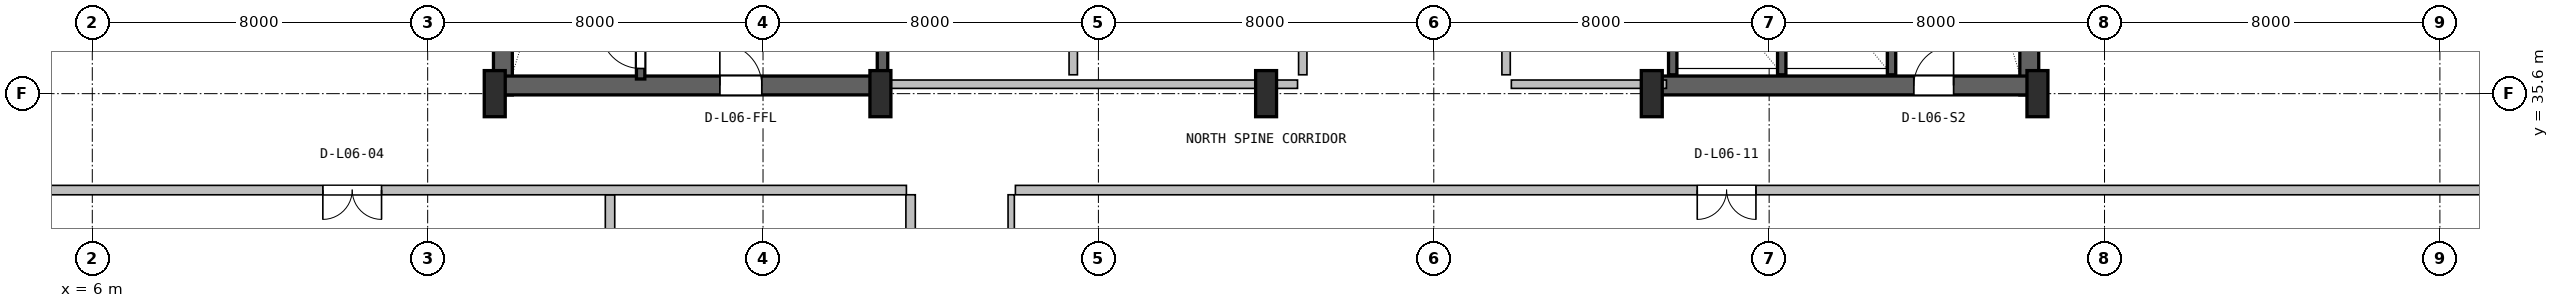
"""IFC4 building model, lengths in metres.
Left out: names, types, materials, properties, quantities, classifications, styles, units other than length and angle.
Written with IfcOpenShell. Run it as: python <this file> out.ifc"""

import sys

from ifc_helpers import new_model, si_unit, direction, frame, frame_2d, origin, origin_2d, place, context, subcontext, project, spatial, rectangle, i_section, extrude, source, transform, mapped, element, fill, save


model = new_model("IFC4")
c1 = context("Model", 3, precision=1e-05, world=origin(), true_north=direction((0.0, 1.0)))
c2 = subcontext(c1, "Body", "Model", "MODEL_VIEW")
j1 = project(units=[si_unit("LENGTHUNIT", "METRE"), si_unit("PLANEANGLEUNIT", "RADIAN")], contexts=[c1])
p1 = place(None, origin())
s1 = spatial("IfcSite", under=j1, at=p1, CompositionType="ELEMENT")
p2 = place(p1, origin())
s2 = spatial("IfcBuilding", under=s1, at=p2, CompositionType="ELEMENT")
p3 = place(p2, frame((0.0, 0.0, 31.5)))
s3 = spatial("IfcBuildingStorey", under=s2, at=p3, CompositionType="ELEMENT", Elevation=31.5)
for number, where, z_axis, x_axis in (
    (1, (15.795, 35.57, 0.0), (0.0, 0.0, 1.0), (0.0, 1.0, 0.0)),
    (2, (52.205, 35.57, 0.0), (0.0, 0.0, 1.0), (0.0, 1.0, 0.0)),
):
    element("IfcWall", number, at=place(p3, frame(where, z_axis=z_axis, x_axis=x_axis)), inside=s3, PredefinedType="SHEAR", context=c2, shape_type="SweptSolid", body=[
        extrude(rectangle(XDim=11.23, YDim=0.45, at=frame_2d((5.615, 0.0))), origin(), (0.0, 0.0, 1.0), 3.65),
    ])
p4 = place(p3, frame((15.57, 35.795, 0.0), z_axis=(0.0, 0.0, 1.0), x_axis=(1.0, 0.0, 0.0)))
e3 = element("IfcWall", 3, at=p4, inside=s3, PredefinedType="SHEAR", context=c2, shape_type="SweptSolid", body=[
    extrude(rectangle(XDim=9.23, YDim=0.45, at=frame_2d((4.615, 0.0))), origin(), (0.0, 0.0, 1.0), 3.65),
])
p5 = place(p4, frame((5.4, 0.0, 0.0)))
e4 = element("IfcOpeningElement", 4, at=p5, cuts=e3, PredefinedType="OPENING", context=c2, shape_type="SweptSolid", body=[
    extrude(rectangle(XDim=1.0, YDim=2.1, at=frame_2d((0.5, 1.05))), frame((0.0, 0.235, 0.0), z_axis=(0.0, -1.0, 0.0), x_axis=(1.0, 0.0, 0.0)), (0.0, 0.0, 1.0), 0.47),
])
p6 = place(p3, frame((43.2, 35.795, 0.0), z_axis=(0.0, 0.0, 1.0), x_axis=(1.0, 0.0, 0.0)))
e5 = element("IfcWall", 5, at=p6, inside=s3, PredefinedType="SHEAR", context=c2, shape_type="SweptSolid", body=[
    extrude(rectangle(XDim=9.23, YDim=0.45, at=frame_2d((4.615, 0.0))), origin(), (0.0, 0.0, 1.0), 3.65),
])
p7 = place(p6, frame((6.25, 0.0, 0.0)))
e6 = element("IfcOpeningElement", 6, at=p7, cuts=e5, PredefinedType="OPENING", context=c2, shape_type="SweptSolid", body=[
    extrude(rectangle(XDim=0.95, YDim=2.1, at=frame_2d((0.475, 1.05))), frame((0.0, 0.235, 0.0), z_axis=(0.0, -1.0, 0.0), x_axis=(1.0, 0.0, 0.0)), (0.0, 0.0, 1.0), 0.47),
])
m1 = source(origin(), c2, "Body", "SweptSolid", [
    extrude(i_section(OverallWidth=0.5, OverallDepth=1.1, WebThickness=0.018, FlangeThickness=0.032, FilletRadius=0.018, at=origin_2d()), origin(), (0.0, 0.0, 1.0), 3.9),
])
for number, where, z_axis, x_axis in (
    (7, (15.6, 35.6, 0.0), (0.0, 0.0, 1.0), (1.0, 0.0, 0.0)),
    (8, (24.8, 35.6, 0.0), (0.0, 0.0, 1.0), (1.0, 0.0, 0.0)),
    (9, (34.0, 35.6, 0.0), (0.0, 0.0, 1.0), (1.0, 0.0, 0.0)),
    (10, (43.2, 35.6, 0.0), (0.0, 0.0, 1.0), (1.0, 0.0, 0.0)),
    (11, (52.4, 35.6, 0.0), (0.0, 0.0, 1.0), (1.0, 0.0, 0.0)),
):
    element("IfcColumn", number, at=place(p3, frame(where, z_axis=z_axis, x_axis=x_axis)), inside=s3, PredefinedType="COLUMN", context=c2, shape_type="MappedRepresentation", body=[
        mapped(m1, transform((0.0, 0.0, 0.0), x_axis=(1.0, 0.0, 0.0), y_axis=(0.0, 1.0, 0.0), z_axis=(0.0, 0.0, 1.0), scale=1.0)),
    ])
p8 = place(p3, frame((19.08, 35.95, 0.0), z_axis=(0.0, 0.0, 1.0), x_axis=(0.0, 1.0, 0.0)))
e12 = element("IfcWall", 12, at=p8, inside=s3, PredefinedType="SHEAR", context=c2, shape_type="SweptSolid", body=[
    extrude(rectangle(XDim=9.65, YDim=0.2, at=frame_2d((4.825, 0.0))), origin(), (0.0, 0.0, 1.0), 3.65),
])
p9 = place(p8, frame((0.25, 0.0, 0.0)))
e13 = element("IfcOpeningElement", 13, at=p9, cuts=e12, PredefinedType="OPENING", context=c2, shape_type="SweptSolid", body=[
    extrude(rectangle(XDim=0.95, YDim=2.1, at=frame_2d((0.475, 1.05))), frame((0.0, 0.11, 0.0), z_axis=(0.0, -1.0, 0.0), x_axis=(1.0, 0.0, 0.0)), (0.0, 0.0, 1.0), 0.22),
])
p10 = place(p3, frame((24.85, 36.05, 0.0), z_axis=(0.0, 0.0, 1.0), x_axis=(0.0, 1.0, 0.0)))
e14 = element("IfcWall", 14, at=p10, inside=s3, PredefinedType="SHEAR", context=c2, shape_type="SweptSolid", body=[
    extrude(rectangle(XDim=10.45, YDim=0.25, at=frame_2d((5.225, 0.0))), origin(), (0.0, 0.0, 1.0), 3.65),
])
p11 = place(p3, frame((48.92, 36.05, 0.0), z_axis=(0.0, 0.0, 1.0), x_axis=(0.0, 1.0, 0.0)))
e15 = element("IfcWall", 15, at=p11, inside=s3, PredefinedType="SHEAR", context=c2, shape_type="SweptSolid", body=[
    extrude(rectangle(XDim=10.5, YDim=0.2, at=frame_2d((5.25, 0.0))), origin(), (0.0, 0.0, 1.0), 3.65),
])
for number, where, z_axis, x_axis in (
    (16, (43.7, 36.05, 0.0), (0.0, 0.0, 1.0), (0.0, 1.0, 0.0)),
    (17, (46.3, 36.05, 0.0), (0.0, 0.0, 1.0), (0.0, 1.0, 0.0)),
):
    element("IfcWall", number, at=place(p3, frame(where, z_axis=z_axis, x_axis=x_axis)), inside=s3, PredefinedType="SHEAR", context=c2, shape_type="SweptSolid", body=[
        extrude(rectangle(XDim=3.05, YDim=0.2, at=frame_2d((1.525, 0.0))), origin(), (0.0, 0.0, 1.0), 3.65),
    ])
p12 = place(p3, frame((25.0, 35.825, 0.0), z_axis=(0.0, 0.0, 1.0), x_axis=(1.0, 0.0, 0.0)))
e18 = element("IfcWall", 18, at=p12, inside=s3, PredefinedType="PLUMBINGWALL", context=c2, shape_type="SweptSolid", body=[
    extrude(rectangle(XDim=9.75, YDim=0.2, at=frame_2d((4.875, 0.0))), origin(), (0.0, 0.0, 1.0), 2.425),
])
for number, where, z_axis, x_axis in (
    (19, (29.4, 36.05, 0.0), (0.0, 0.0, 1.0), (0.0, 1.0, 0.0)),
    (20, (34.875, 36.05, 0.0), (0.0, 0.0, 1.0), (0.0, 1.0, 0.0)),
):
    element("IfcWall", number, at=place(p3, frame(where, z_axis=z_axis, x_axis=x_axis)), inside=s3, PredefinedType="PLUMBINGWALL", context=c2, shape_type="SweptSolid", body=[
        extrude(rectangle(XDim=3.1, YDim=0.2, at=frame_2d((1.55, 0.0))), origin(), (0.0, 0.0, 1.0), 3.63),
    ])
p13 = place(p3, frame((39.85, 35.825, 0.0), z_axis=(0.0, 0.0, 1.0), x_axis=(1.0, 0.0, 0.0)))
e21 = element("IfcWall", 21, at=p13, inside=s3, PredefinedType="SOLIDWALL", context=c2, shape_type="SweptSolid", body=[
    extrude(rectangle(XDim=3.7, YDim=0.2, at=frame_2d((1.85, 0.0))), origin(), (0.0, 0.0, 1.0), 2.425),
])
p14 = place(p3, frame((39.725, 36.05, 0.0), z_axis=(0.0, 0.0, 1.0), x_axis=(0.0, 1.0, 0.0)))
e22 = element("IfcWall", 22, at=p14, inside=s3, PredefinedType="SOLIDWALL", context=c2, shape_type="SweptSolid", body=[
    extrude(rectangle(XDim=3.1, YDim=0.2, at=frame_2d((1.55, 0.0))), origin(), (0.0, 0.0, 1.0), 3.63),
])
p15 = place(p3, frame((18.35, 1.38, 0.0), z_axis=(0.0, 0.0, 1.0), x_axis=(0.0, 1.0, 0.0)))
e23 = element("IfcWall", 23, at=p15, inside=s3, PredefinedType="PARTITIONING", context=c2, shape_type="SweptSolid", body=[
    extrude(rectangle(XDim=31.808, YDim=0.225, at=frame_2d((15.904, 0.0))), origin(), (0.0, 0.0, 1.0), 3.208),
])
p16 = place(p3, frame((2.18, 33.3, 0.0), z_axis=(0.0, 0.0, 1.0), x_axis=(1.0, 0.0, 0.0)))
e24 = element("IfcWall", 24, at=p16, inside=s3, PredefinedType="PARTITIONING", context=c2, shape_type="SweptSolid", body=[
    extrude(rectangle(XDim=23.24, YDim=0.225, at=frame_2d((11.62, 0.0))), origin(), (0.0, 0.0, 1.0), 2.852),
])
p17 = place(p16, frame((9.32, 0.0, 0.0)))
e25 = element("IfcOpeningElement", 25, at=p17, cuts=e24, PredefinedType="OPENING", context=c2, shape_type="SweptSolid", body=[
    extrude(rectangle(XDim=1.4, YDim=2.12, at=frame_2d((0.7, 1.06))), frame((0.0, 0.123, 0.0), z_axis=(0.0, -1.0, 0.0), x_axis=(1.0, 0.0, 0.0)), (0.0, 0.0, 1.0), 0.245),
])
p18 = place(p3, frame((25.52, 1.38, 0.0), z_axis=(0.0, 0.0, 1.0), x_axis=(0.0, 1.0, 0.0)))
e26 = element("IfcWall", 26, at=p18, inside=s3, PredefinedType="PARTITIONING", context=c2, shape_type="SweptSolid", body=[
    extrude(rectangle(XDim=31.808, YDim=0.225, at=frame_2d((15.904, 0.0))), origin(), (0.0, 0.0, 1.0), 2.852),
])
p19 = place(p18, frame((15.514, 0.0, 0.0)))
e27 = element("IfcOpeningElement", 27, at=p19, cuts=e26, PredefinedType="OPENING", context=c2, shape_type="SweptSolid", body=[
    extrude(rectangle(XDim=1.4, YDim=2.12, at=frame_2d((0.7, 1.06))), frame((0.0, 0.123, 0.0), z_axis=(0.0, -1.0, 0.0), x_axis=(1.0, 0.0, 0.0)), (0.0, 0.0, 1.0), 0.245),
])
p20 = place(p3, frame((27.92, 18.355, 0.0), z_axis=(0.0, 0.0, 1.0), x_axis=(0.0, 1.0, 0.0)))
e28 = element("IfcWall", 28, at=p20, inside=s3, PredefinedType="PARTITIONING", context=c2, shape_type="SweptSolid", body=[
    extrude(rectangle(XDim=14.833, YDim=0.15, at=frame_2d((7.417, 0.0))), origin(), (0.0, 0.0, 1.0), 2.852),
])
p21 = place(p20, frame((5.61, 0.0, 0.0)))
e29 = element("IfcOpeningElement", 29, at=p21, cuts=e28, PredefinedType="OPENING", context=c2, shape_type="SweptSolid", body=[
    extrude(rectangle(XDim=1.05, YDim=2.1, at=frame_2d((0.525, 1.05))), frame((0.0, 0.085, 0.0), z_axis=(0.0, -1.0, 0.0), x_axis=(1.0, 0.0, 0.0)), (0.0, 0.0, 1.0), 0.17),
])
p22 = place(p20, frame((9.14, 0.0, 0.0)))
e30 = element("IfcOpeningElement", 30, at=p22, cuts=e28, PredefinedType="OPENING", context=c2, shape_type="SweptSolid", body=[
    extrude(rectangle(XDim=1.4, YDim=2.12, at=frame_2d((0.7, 1.06))), frame((0.0, 0.085, 0.0), z_axis=(0.0, -1.0, 0.0), x_axis=(1.0, 0.0, 0.0)), (0.0, 0.0, 1.0), 0.17),
])
p23 = place(p3, frame((28.02, 33.3, 0.0), z_axis=(0.0, 0.0, 1.0), x_axis=(1.0, 0.0, 0.0)))
e31 = element("IfcWall", 31, at=p23, inside=s3, PredefinedType="PARTITIONING", context=c2, shape_type="SweptSolid", body=[
    extrude(rectangle(XDim=37.8, YDim=0.225, at=frame_2d((18.9, 0.0))), origin(), (0.0, 0.0, 1.0), 2.852),
])
p24 = place(p23, frame((16.265, 0.0, 0.0)))
e32 = element("IfcOpeningElement", 32, at=p24, cuts=e31, PredefinedType="OPENING", context=c2, shape_type="SweptSolid", body=[
    extrude(rectangle(XDim=1.4, YDim=2.12, at=frame_2d((0.7, 1.06))), frame((0.0, 0.123, 0.0), z_axis=(0.0, -1.0, 0.0), x_axis=(1.0, 0.0, 0.0)), (0.0, 0.0, 1.0), 0.245),
])
m2 = source(origin(), c2, "Body", "SweptSolid", [
    extrude(rectangle(XDim=0.95, YDim=2.1, at=frame_2d((0.475, 1.05))), frame((0.0, 0.025, 0.0), z_axis=(0.0, -1.0, 0.0), x_axis=(1.0, 0.0, 0.0)), (0.0, 0.0, 1.0), 0.05),
])
p25 = place(p9, origin())
e33 = element("IfcDoor", 33, at=p25, inside=s3, OperationType="SINGLE_SWING_RIGHT", PredefinedType="DOOR", context=c2, shape_type="MappedRepresentation", body=[
    mapped(m2, transform((0.0, 0.0, 0.0), x_axis=(1.0, 0.0, 0.0), y_axis=(0.0, 1.0, 0.0), z_axis=(0.0, 0.0, 1.0), scale=1.0)),
])
fill(e13, e33)
m3 = source(origin(), c2, "Body", "SweptSolid", [
    extrude(rectangle(XDim=1.0, YDim=2.1, at=frame_2d((0.5, 1.05))), frame((0.0, 0.025, 0.0), z_axis=(0.0, -1.0, 0.0), x_axis=(1.0, 0.0, 0.0)), (0.0, 0.0, 1.0), 0.05),
])
p26 = place(p5, origin())
e34 = element("IfcDoor", 34, at=p26, inside=s3, OperationType="SINGLE_SWING_LEFT", PredefinedType="DOOR", context=c2, shape_type="MappedRepresentation", body=[
    mapped(m3, transform((0.0, 0.0, 0.0), x_axis=(1.0, 0.0, 0.0), y_axis=(0.0, 1.0, 0.0), z_axis=(0.0, 0.0, 1.0), scale=1.0)),
])
fill(e4, e34)
p27 = place(p7, origin())
e35 = element("IfcDoor", 35, at=p27, inside=s3, OperationType="SINGLE_SWING_RIGHT", PredefinedType="DOOR", context=c2, shape_type="MappedRepresentation", body=[
    mapped(m2, transform((0.0, 0.0, 0.0), x_axis=(1.0, 0.0, 0.0), y_axis=(0.0, 1.0, 0.0), z_axis=(0.0, 0.0, 1.0), scale=1.0)),
])
fill(e6, e35)
m4 = source(origin(), c2, "Body", "SweptSolid", [
    extrude(rectangle(XDim=1.4, YDim=2.12, at=frame_2d((0.7, 1.06))), frame((0.0, 0.025, 0.0), z_axis=(0.0, -1.0, 0.0), x_axis=(1.0, 0.0, 0.0)), (0.0, 0.0, 1.0), 0.05),
])
p28 = place(p17, frame((1.4, 0.0, 0.0), z_axis=(0.0, 0.0, 1.0), x_axis=(-1.0, 0.0, 0.0)))
e36 = element("IfcDoor", 36, at=p28, inside=s3, OperationType="DOUBLE_DOOR_SINGLE_SWING", PredefinedType="DOOR", context=c2, shape_type="MappedRepresentation", body=[
    mapped(m4, transform((0.0, 0.0, 0.0), x_axis=(1.0, 0.0, 0.0), y_axis=(0.0, 1.0, 0.0), z_axis=(0.0, 0.0, 1.0), scale=1.0)),
])
fill(e25, e36)
p29 = place(p24, frame((1.4, 0.0, 0.0), z_axis=(0.0, 0.0, 1.0), x_axis=(-1.0, 0.0, 0.0)))
e37 = element("IfcDoor", 37, at=p29, inside=s3, OperationType="DOUBLE_DOOR_SINGLE_SWING", PredefinedType="DOOR", context=c2, shape_type="MappedRepresentation", body=[
    mapped(m4, transform((0.0, 0.0, 0.0), x_axis=(1.0, 0.0, 0.0), y_axis=(0.0, 1.0, 0.0), z_axis=(0.0, 0.0, 1.0), scale=1.0)),
])
fill(e32, e37)
save(model, sys.argv[1])
